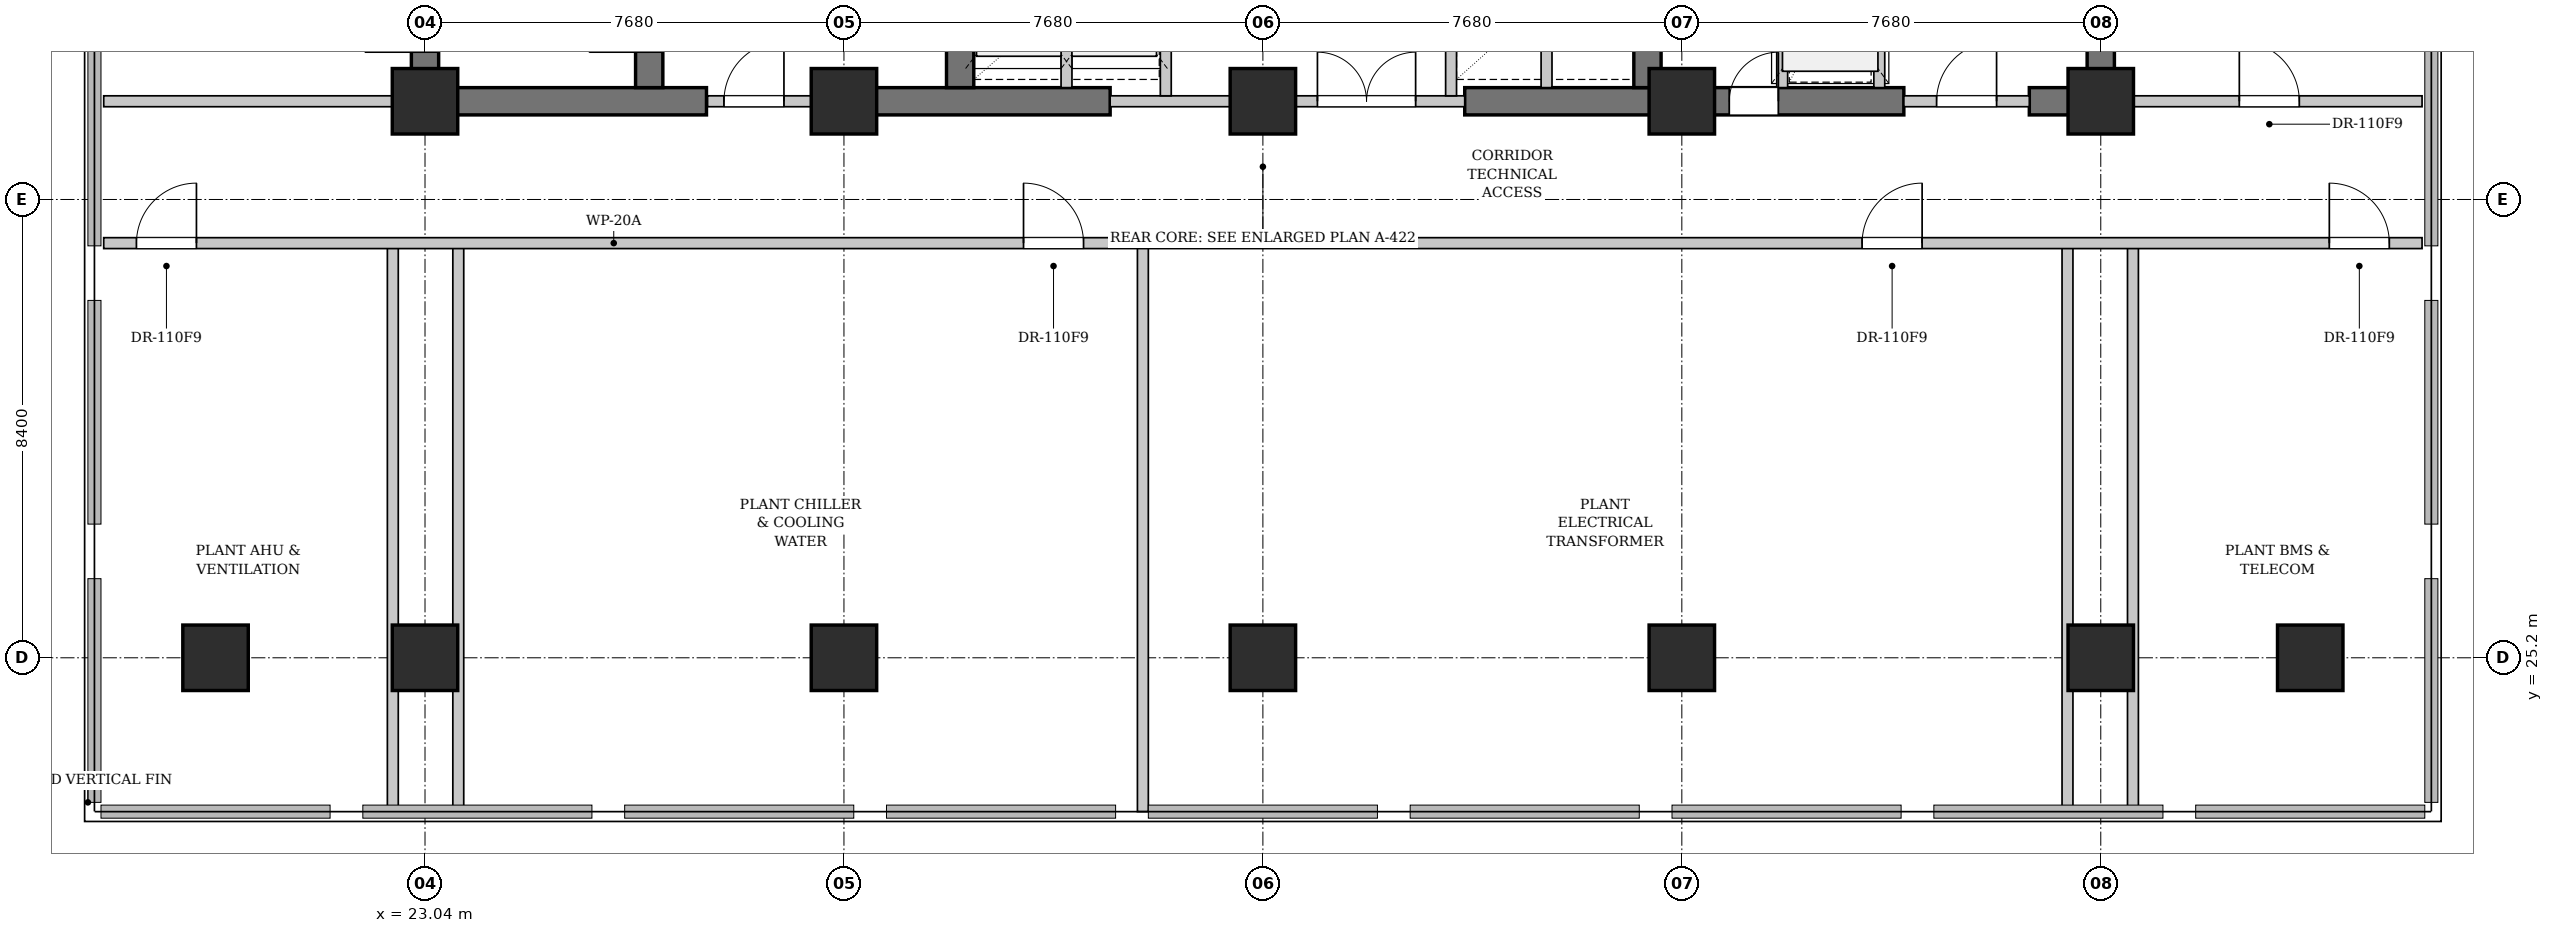
"""IFC4 building model, lengths in metres.
Left out: names, types, materials, properties, quantities, classifications, styles, units other than length and angle.
Written with IfcOpenShell. Run it as: python <this file> out.ifc"""

import sys

from ifc_helpers import new_model, si_unit, direction, frame, frame_2d, origin, origin_2d, place, context, subcontext, project, spatial, rectangle, extrude, element, fill, save


model = new_model("IFC4")
c1 = context("Model", 3, precision=1e-05, world=origin(), true_north=direction((0.0, 1.0)))
c2 = subcontext(c1, "Body", "Model", "MODEL_VIEW")
j1 = project(units=[si_unit("LENGTHUNIT", "METRE"), si_unit("PLANEANGLEUNIT", "RADIAN")], contexts=[c1])
p1 = place(None, origin())
s1 = spatial("IfcSite", under=j1, at=p1, CompositionType="ELEMENT")
p2 = place(p1, origin())
s2 = spatial("IfcBuilding", under=s1, at=p2, CompositionType="ELEMENT")
p3 = place(p2, frame((0.0, 0.0, 81.9)))
s3 = spatial("IfcBuildingStorey", under=s2, at=p3, CompositionType="ELEMENT", Elevation=81.9)
p4 = place(p3, frame((22.79, 35.4, 0.0), z_axis=(0.0, 0.0, 1.0), x_axis=(1.0, 0.0, 0.0)))
e1 = element("IfcWall", 1, at=p4, inside=s3, PredefinedType="SHEAR", context=c2, shape_type="SweptSolid", body=[
    extrude(rectangle(XDim=5.41, YDim=0.5, at=frame_2d((2.705, 0.0))), origin(), (0.0, 0.0, 1.0), 3.48),
])
p5 = place(p3, frame((30.72, 35.4, 0.0), z_axis=(0.0, 0.0, 1.0), x_axis=(1.0, 0.0, 0.0)))
e2 = element("IfcWall", 2, at=p5, inside=s3, PredefinedType="SHEAR", context=c2, shape_type="SweptSolid", body=[
    extrude(rectangle(XDim=4.88, YDim=0.5, at=frame_2d((2.44, 0.0))), origin(), (0.0, 0.0, 1.0), 3.48),
])
p6 = place(p3, frame((42.1, 35.4, 0.0), z_axis=(0.0, 0.0, 1.0), x_axis=(1.0, 0.0, 0.0)))
e3 = element("IfcWall", 3, at=p6, inside=s3, PredefinedType="SHEAR", context=c2, shape_type="SweptSolid", body=[
    extrude(rectangle(XDim=8.05, YDim=0.5, at=frame_2d((4.025, 0.0))), origin(), (0.0, 0.0, 1.0), 3.48),
])
p7 = place(p6, frame((4.85, 0.0, 0.0)))
e4 = element("IfcOpeningElement", 4, at=p7, cuts=e3, PredefinedType="OPENING", context=c2, shape_type="SweptSolid", body=[
    extrude(rectangle(XDim=0.9, YDim=2.15, at=frame_2d((0.45, 1.075))), frame((0.0, 0.26, 0.0), z_axis=(0.0, -1.0, 0.0), x_axis=(1.0, 0.0, 0.0)), (0.0, 0.0, 1.0), 0.52),
])
p8 = place(p3, frame((52.45, 35.4, 0.0), z_axis=(0.0, 0.0, 1.0), x_axis=(1.0, 0.0, 0.0)))
e5 = element("IfcWall", 5, at=p8, inside=s3, PredefinedType="SHEAR", context=c2, shape_type="SweptSolid", body=[
    extrude(rectangle(XDim=1.56, YDim=0.5, at=frame_2d((0.78, 0.0))), origin(), (0.0, 0.0, 1.0), 3.48),
])
p9 = place(p3, frame((23.04, 35.65, 0.0), z_axis=(0.0, 0.0, 1.0), x_axis=(0.0, 1.0, 0.0)))
e6 = element("IfcWall", 6, at=p9, inside=s3, PredefinedType="SHEAR", context=c2, shape_type="SweptSolid", body=[
    extrude(rectangle(XDim=10.3, YDim=0.5, at=frame_2d((5.15, 0.0))), origin(), (0.0, 0.0, 1.0), 3.48),
])
p10 = place(p9, frame((0.65, 0.0, 0.0)))
e7 = element("IfcOpeningElement", 7, at=p10, cuts=e6, PredefinedType="OPENING", context=c2, shape_type="SweptSolid", body=[
    extrude(rectangle(XDim=1.1, YDim=2.15, at=frame_2d((0.55, 1.075))), frame((0.0, 0.26, 0.0), z_axis=(0.0, -1.0, 0.0), x_axis=(1.0, 0.0, 0.0)), (0.0, 0.0, 1.0), 0.52),
])
p11 = place(p3, frame((27.15, 35.65, 0.0), z_axis=(0.0, 0.0, 1.0), x_axis=(0.0, 1.0, 0.0)))
e8 = element("IfcWall", 8, at=p11, inside=s3, PredefinedType="SHEAR", context=c2, shape_type="SweptSolid", body=[
    extrude(rectangle(XDim=10.3, YDim=0.5, at=frame_2d((5.15, 0.0))), origin(), (0.0, 0.0, 1.0), 3.48),
])
p12 = place(p11, frame((0.65, 0.0, 0.0)))
e9 = element("IfcOpeningElement", 9, at=p12, cuts=e8, PredefinedType="OPENING", context=c2, shape_type="SweptSolid", body=[
    extrude(rectangle(XDim=1.1, YDim=2.15, at=frame_2d((0.55, 1.075))), frame((0.0, 0.26, 0.0), z_axis=(0.0, -1.0, 0.0), x_axis=(1.0, 0.0, 0.0)), (0.0, 0.0, 1.0), 0.52),
])
for number, where, z_axis, x_axis in (
    (10, (32.85, 35.65, 0.0), (0.0, 0.0, 1.0), (0.0, 1.0, 0.0)),
    (11, (45.45, 35.65, 0.0), (0.0, 0.0, 1.0), (0.0, 1.0, 0.0)),
    (12, (53.76, 35.65, 0.0), (0.0, 0.0, 1.0), (0.0, 1.0, 0.0)),
):
    element("IfcWall", number, at=place(p3, frame(where, z_axis=z_axis, x_axis=x_axis)), inside=s3, PredefinedType="SHEAR", context=c2, shape_type="SweptSolid", body=[
        extrude(rectangle(XDim=10.3, YDim=0.5, at=frame_2d((5.15, 0.0))), origin(), (0.0, 0.0, 1.0), 3.48),
    ])
for number, where, z_axis, x_axis in (
    (13, (23.04, 35.4, 0.0), (0.0, 0.0, 1.0), (1.0, 0.0, 0.0)),
    (14, (23.04, 25.2, 0.0), (0.0, 0.0, 1.0), (1.0, 0.0, 0.0)),
    (15, (30.72, 35.4, 0.0), (0.0, 0.0, 1.0), (1.0, 0.0, 0.0)),
    (16, (30.72, 25.2, 0.0), (0.0, 0.0, 1.0), (1.0, 0.0, 0.0)),
    (17, (38.4, 35.4, 0.0), (0.0, 0.0, 1.0), (1.0, 0.0, 0.0)),
    (18, (38.4, 25.2, 0.0), (0.0, 0.0, 1.0), (1.0, 0.0, 0.0)),
    (19, (46.08, 35.4, 0.0), (0.0, 0.0, 1.0), (1.0, 0.0, 0.0)),
    (20, (46.08, 25.2, 0.0), (0.0, 0.0, 1.0), (1.0, 0.0, 0.0)),
    (21, (53.76, 35.4, 0.0), (0.0, 0.0, 1.0), (1.0, 0.0, 0.0)),
    (22, (53.76, 25.2, 0.0), (0.0, 0.0, 1.0), (1.0, 0.0, 0.0)),
    (23, (19.2, 25.2, 0.0), (0.0, 0.0, 1.0), (1.0, 0.0, 0.0)),
    (24, (57.6, 25.2, 0.0), (0.0, 0.0, 1.0), (1.0, 0.0, 0.0)),
):
    element("IfcColumn", number, at=place(p3, frame(where, z_axis=z_axis, x_axis=x_axis)), inside=s3, PredefinedType="COLUMN", context=c2, shape_type="SweptSolid", body=[
        extrude(rectangle(XDim=1.2, YDim=1.2, at=origin_2d()), origin(), (0.0, 0.0, 1.0), 3.9),
    ])
p13 = place(p3, frame((28.22, 35.4, 0.0), z_axis=(0.0, 0.0, 1.0), x_axis=(1.0, 0.0, 0.0)))
e25 = element("IfcWall", 25, at=p13, inside=s3, PredefinedType="PARTITIONING", context=c2, shape_type="SweptSolid", body=[
    extrude(rectangle(XDim=2.5, YDim=0.2, at=frame_2d((1.25, 0.0))), origin(), (0.0, 0.0, 1.0), 2.565),
])
p14 = place(p13, frame((0.3, 0.0, 0.0)))
e26 = element("IfcOpeningElement", 26, at=p14, cuts=e25, PredefinedType="OPENING", context=c2, shape_type="SweptSolid", body=[
    extrude(rectangle(XDim=1.1, YDim=2.15, at=frame_2d((0.55, 1.075))), frame((0.0, 0.11, 0.0), z_axis=(0.0, -1.0, 0.0), x_axis=(1.0, 0.0, 0.0)), (0.0, 0.0, 1.0), 0.22),
])
p15 = place(p3, frame((35.6, 35.4, 0.0), z_axis=(0.0, 0.0, 1.0), x_axis=(1.0, 0.0, 0.0)))
e27 = element("IfcWall", 27, at=p15, inside=s3, PredefinedType="PARTITIONING", context=c2, shape_type="SweptSolid", body=[
    extrude(rectangle(XDim=6.5, YDim=0.2, at=frame_2d((3.25, 0.0))), origin(), (0.0, 0.0, 1.0), 2.565),
])
p16 = place(p15, frame((3.8, 0.0, 0.0)))
e28 = element("IfcOpeningElement", 28, at=p16, cuts=e27, PredefinedType="OPENING", context=c2, shape_type="SweptSolid", body=[
    extrude(rectangle(XDim=1.8, YDim=2.3, at=frame_2d((0.9, 1.15))), frame((0.0, 0.11, 0.0), z_axis=(0.0, -1.0, 0.0), x_axis=(1.0, 0.0, 0.0)), (0.0, 0.0, 1.0), 0.22),
])
p17 = place(p3, frame((34.8, 35.65, 0.0), z_axis=(0.0, 0.0, 1.0), x_axis=(0.0, 1.0, 0.0)))
e29 = element("IfcWall", 29, at=p17, inside=s3, PredefinedType="PARTITIONING", context=c2, shape_type="SweptSolid", body=[
    extrude(rectangle(XDim=3.25, YDim=0.2, at=frame_2d((1.625, 0.0))), origin(), (0.0, 0.0, 1.0), 3.48),
])
p18 = place(p3, frame((36.62, 35.5, 0.0), z_axis=(0.0, 0.0, 1.0), x_axis=(0.0, 1.0, 0.0)))
e30 = element("IfcWall", 30, at=p18, inside=s3, PredefinedType="PARTITIONING", context=c2, shape_type="SweptSolid", body=[
    extrude(rectangle(XDim=3.4, YDim=0.2, at=frame_2d((1.7, 0.0))), origin(), (0.0, 0.0, 1.0), 3.48),
])
p19 = place(p3, frame((43.6, 35.65, 0.0), z_axis=(0.0, 0.0, 1.0), x_axis=(0.0, 1.0, 0.0)))
e31 = element("IfcWall", 31, at=p19, inside=s3, PredefinedType="PARTITIONING", context=c2, shape_type="SweptSolid", body=[
    extrude(rectangle(XDim=3.25, YDim=0.2, at=frame_2d((1.625, 0.0))), origin(), (0.0, 0.0, 1.0), 3.48),
])
p20 = place(p3, frame((41.85, 35.5, 0.0), z_axis=(0.0, 0.0, 1.0), x_axis=(0.0, 1.0, 0.0)))
e32 = element("IfcWall", 32, at=p20, inside=s3, PredefinedType="PARTITIONING", context=c2, shape_type="SweptSolid", body=[
    extrude(rectangle(XDim=3.4, YDim=0.2, at=frame_2d((1.7, 0.0))), origin(), (0.0, 0.0, 1.0), 3.48),
])
p21 = place(p3, frame((50.15, 35.4, 0.0), z_axis=(0.0, 0.0, 1.0), x_axis=(1.0, 0.0, 0.0)))
e33 = element("IfcWall", 33, at=p21, inside=s3, PredefinedType="PARTITIONING", context=c2, shape_type="SweptSolid", body=[
    extrude(rectangle(XDim=2.3, YDim=0.2, at=frame_2d((1.15, 0.0))), origin(), (0.0, 0.0, 1.0), 2.565),
])
p22 = place(p21, frame((0.6, 0.0, 0.0)))
e34 = element("IfcOpeningElement", 34, at=p22, cuts=e33, PredefinedType="OPENING", context=c2, shape_type="SweptSolid", body=[
    extrude(rectangle(XDim=1.1, YDim=2.15, at=frame_2d((0.55, 1.075))), frame((0.0, 0.11, 0.0), z_axis=(0.0, -1.0, 0.0), x_axis=(1.0, 0.0, 0.0)), (0.0, 0.0, 1.0), 0.22),
])
p23 = place(p3, frame((49.7, 35.65, 0.0), z_axis=(0.0, 0.0, 1.0), x_axis=(0.0, 1.0, 0.0)))
e35 = element("IfcWall", 35, at=p23, inside=s3, PredefinedType="PARTITIONING", context=c2, shape_type="SweptSolid", body=[
    extrude(rectangle(XDim=3.15, YDim=0.2, at=frame_2d((1.575, 0.0))), origin(), (0.0, 0.0, 1.0), 3.48),
])
p24 = place(p23, frame((0.85, 0.0, 0.0)))
e36 = element("IfcOpeningElement", 36, at=p24, cuts=e35, PredefinedType="OPENING", context=c2, shape_type="SweptSolid", body=[
    extrude(rectangle(XDim=1.2, YDim=2.2, at=frame_2d((0.6, 1.1))), frame((0.0, 0.11, 0.0), z_axis=(0.0, -1.0, 0.0), x_axis=(1.0, 0.0, 0.0)), (0.0, 0.0, 1.0), 0.22),
])
p25 = place(p3, frame((47.92, 35.65, 0.0), z_axis=(0.0, 0.0, 1.0), x_axis=(0.0, 1.0, 0.0)))
e37 = element("IfcWall", 37, at=p25, inside=s3, PredefinedType="PARTITIONING", context=c2, shape_type="SweptSolid", body=[
    extrude(rectangle(XDim=3.15, YDim=0.2, at=frame_2d((1.575, 0.0))), origin(), (0.0, 0.0, 1.0), 3.48),
])
p26 = place(p3, frame((17.15, 35.4, 0.0), z_axis=(0.0, 0.0, 1.0), x_axis=(1.0, 0.0, 0.0)))
e38 = element("IfcWall", 38, at=p26, inside=s3, PredefinedType="PARTITIONING", context=c2, shape_type="SweptSolid", body=[
    extrude(rectangle(XDim=5.6, YDim=0.2, at=frame_2d((2.8, 0.0))), origin(), (0.0, 0.0, 1.0), 3.48),
])
p27 = place(p3, frame((54.05, 35.4, 0.0), z_axis=(0.0, 0.0, 1.0), x_axis=(1.0, 0.0, 0.0)))
e39 = element("IfcWall", 39, at=p27, inside=s3, PredefinedType="PARTITIONING", context=c2, shape_type="SweptSolid", body=[
    extrude(rectangle(XDim=5.6, YDim=0.2, at=frame_2d((2.8, 0.0))), origin(), (0.0, 0.0, 1.0), 3.48),
])
p28 = place(p27, frame((2.25, 0.0, 0.0)))
e40 = element("IfcOpeningElement", 40, at=p28, cuts=e39, PredefinedType="OPENING", context=c2, shape_type="SweptSolid", body=[
    extrude(rectangle(XDim=1.1, YDim=2.15, at=frame_2d((0.55, 1.075))), frame((0.0, 0.11, 0.0), z_axis=(0.0, -1.0, 0.0), x_axis=(1.0, 0.0, 0.0)), (0.0, 0.0, 1.0), 0.22),
])
for number, where, z_axis, x_axis in (
    (41, (22.45, 22.38, 0.0), (0.0, 0.0, 1.0), (0.0, 1.0, 0.0)),
    (42, (23.65, 22.38, 0.0), (0.0, 0.0, 1.0), (0.0, 1.0, 0.0)),
    (43, (36.2, 22.38, 0.0), (0.0, 0.0, 1.0), (0.0, 1.0, 0.0)),
    (44, (53.15, 22.38, 0.0), (0.0, 0.0, 1.0), (0.0, 1.0, 0.0)),
    (45, (54.35, 22.38, 0.0), (0.0, 0.0, 1.0), (0.0, 1.0, 0.0)),
):
    element("IfcWall", number, at=place(p3, frame(where, z_axis=z_axis, x_axis=x_axis)), inside=s3, PredefinedType="PARTITIONING", context=c2, shape_type="SweptSolid", body=[
        extrude(rectangle(XDim=10.42, YDim=0.2, at=frame_2d((5.21, 0.0))), origin(), (0.0, 0.0, 1.0), 3.48),
    ])
p29 = place(p3, frame((17.15, 32.8, 0.0), z_axis=(0.0, 0.0, 1.0), x_axis=(1.0, 0.0, 0.0)))
e46 = element("IfcWall", 46, at=p29, inside=s3, PredefinedType="PARTITIONING", context=c2, shape_type="SweptSolid", body=[
    extrude(rectangle(XDim=42.5, YDim=0.2, at=frame_2d((21.25, 0.0))), origin(), (0.0, 0.0, 1.0), 3.48),
])
p30 = place(p29, frame((0.6, 0.0, 0.0)))
e47 = element("IfcOpeningElement", 47, at=p30, cuts=e46, PredefinedType="OPENING", context=c2, shape_type="SweptSolid", body=[
    extrude(rectangle(XDim=1.1, YDim=2.15, at=frame_2d((0.55, 1.075))), frame((0.0, 0.11, 0.0), z_axis=(0.0, -1.0, 0.0), x_axis=(1.0, 0.0, 0.0)), (0.0, 0.0, 1.0), 0.22),
])
p31 = place(p29, frame((16.862, 0.0, 0.0)))
e48 = element("IfcOpeningElement", 48, at=p31, cuts=e46, PredefinedType="OPENING", context=c2, shape_type="SweptSolid", body=[
    extrude(rectangle(XDim=1.1, YDim=2.15, at=frame_2d((0.55, 1.075))), frame((0.0, 0.11, 0.0), z_axis=(0.0, -1.0, 0.0), x_axis=(1.0, 0.0, 0.0)), (0.0, 0.0, 1.0), 0.22),
])
p32 = place(p29, frame((32.235, 0.0, 0.0)))
e49 = element("IfcOpeningElement", 49, at=p32, cuts=e46, PredefinedType="OPENING", context=c2, shape_type="SweptSolid", body=[
    extrude(rectangle(XDim=1.1, YDim=2.15, at=frame_2d((0.55, 1.075))), frame((0.0, 0.11, 0.0), z_axis=(0.0, -1.0, 0.0), x_axis=(1.0, 0.0, 0.0)), (0.0, 0.0, 1.0), 0.22),
])
p33 = place(p29, frame((40.8, 0.0, 0.0)))
e50 = element("IfcOpeningElement", 50, at=p33, cuts=e46, PredefinedType="OPENING", context=c2, shape_type="SweptSolid", body=[
    extrude(rectangle(XDim=1.1, YDim=2.15, at=frame_2d((0.55, 1.075))), frame((0.0, 0.11, 0.0), z_axis=(0.0, -1.0, 0.0), x_axis=(1.0, 0.0, 0.0)), (0.0, 0.0, 1.0), 0.22),
])
p34 = place(p14, origin())
e51 = element("IfcDoor", 51, at=p34, inside=s3, OperationType="SINGLE_SWING_RIGHT", PredefinedType="DOOR", context=c2, shape_type="SweptSolid", body=[
    extrude(rectangle(XDim=1.1, YDim=2.15, at=frame_2d((0.55, 1.075))), frame((0.0, 0.025, 0.0), z_axis=(0.0, -1.0, 0.0), x_axis=(1.0, 0.0, 0.0)), (0.0, 0.0, 1.0), 0.05),
])
fill(e26, e51)
p35 = place(p16, origin())
e52 = element("IfcDoor", 52, at=p35, inside=s3, OperationType="DOUBLE_DOOR_SINGLE_SWING", PredefinedType="DOOR", context=c2, shape_type="SweptSolid", body=[
    extrude(rectangle(XDim=1.8, YDim=2.3, at=frame_2d((0.9, 1.15))), frame((0.0, 0.025, 0.0), z_axis=(0.0, -1.0, 0.0), x_axis=(1.0, 0.0, 0.0)), (0.0, 0.0, 1.0), 0.05),
])
fill(e28, e52)
p36 = place(p22, origin())
e53 = element("IfcDoor", 53, at=p36, inside=s3, OperationType="SINGLE_SWING_RIGHT", PredefinedType="DOOR", context=c2, shape_type="SweptSolid", body=[
    extrude(rectangle(XDim=1.1, YDim=2.15, at=frame_2d((0.55, 1.075))), frame((0.0, 0.025, 0.0), z_axis=(0.0, -1.0, 0.0), x_axis=(1.0, 0.0, 0.0)), (0.0, 0.0, 1.0), 0.05),
])
fill(e34, e53)
p37 = place(p28, origin())
e54 = element("IfcDoor", 54, at=p37, inside=s3, OperationType="SINGLE_SWING_LEFT", PredefinedType="DOOR", context=c2, shape_type="SweptSolid", body=[
    extrude(rectangle(XDim=1.1, YDim=2.15, at=frame_2d((0.55, 1.075))), frame((0.0, 0.025, 0.0), z_axis=(0.0, -1.0, 0.0), x_axis=(1.0, 0.0, 0.0)), (0.0, 0.0, 1.0), 0.05),
])
fill(e40, e54)
p38 = place(p30, origin())
e55 = element("IfcDoor", 55, at=p38, inside=s3, OperationType="SINGLE_SWING_RIGHT", PredefinedType="DOOR", context=c2, shape_type="SweptSolid", body=[
    extrude(rectangle(XDim=1.1, YDim=2.15, at=frame_2d((0.55, 1.075))), frame((0.0, 0.025, 0.0), z_axis=(0.0, -1.0, 0.0), x_axis=(1.0, 0.0, 0.0)), (0.0, 0.0, 1.0), 0.05),
])
fill(e47, e55)
p39 = place(p31, origin())
e56 = element("IfcDoor", 56, at=p39, inside=s3, OperationType="SINGLE_SWING_LEFT", PredefinedType="DOOR", context=c2, shape_type="SweptSolid", body=[
    extrude(rectangle(XDim=1.1, YDim=2.15, at=frame_2d((0.55, 1.075))), frame((0.0, 0.025, 0.0), z_axis=(0.0, -1.0, 0.0), x_axis=(1.0, 0.0, 0.0)), (0.0, 0.0, 1.0), 0.05),
])
fill(e48, e56)
p40 = place(p32, origin())
e57 = element("IfcDoor", 57, at=p40, inside=s3, OperationType="SINGLE_SWING_RIGHT", PredefinedType="DOOR", context=c2, shape_type="SweptSolid", body=[
    extrude(rectangle(XDim=1.1, YDim=2.15, at=frame_2d((0.55, 1.075))), frame((0.0, 0.025, 0.0), z_axis=(0.0, -1.0, 0.0), x_axis=(1.0, 0.0, 0.0)), (0.0, 0.0, 1.0), 0.05),
])
fill(e49, e57)
p41 = place(p33, origin())
e58 = element("IfcDoor", 58, at=p41, inside=s3, OperationType="SINGLE_SWING_LEFT", PredefinedType="DOOR", context=c2, shape_type="SweptSolid", body=[
    extrude(rectangle(XDim=1.1, YDim=2.15, at=frame_2d((0.55, 1.075))), frame((0.0, 0.025, 0.0), z_axis=(0.0, -1.0, 0.0), x_axis=(1.0, 0.0, 0.0)), (0.0, 0.0, 1.0), 0.05),
])
fill(e50, e58)
p42 = place(p7, origin())
e59 = element("IfcDoor", 59, at=p42, inside=s3, OperationType="SINGLE_SWING_RIGHT", PredefinedType="DOOR", context=c2, shape_type="SweptSolid", body=[
    extrude(rectangle(XDim=0.9, YDim=2.15, at=frame_2d((0.45, 1.075))), frame((0.0, 0.025, 0.0), z_axis=(0.0, -1.0, 0.0), x_axis=(1.0, 0.0, 0.0)), (0.0, 0.0, 1.0), 0.05),
])
fill(e4, e59)
save(model, sys.argv[1])
